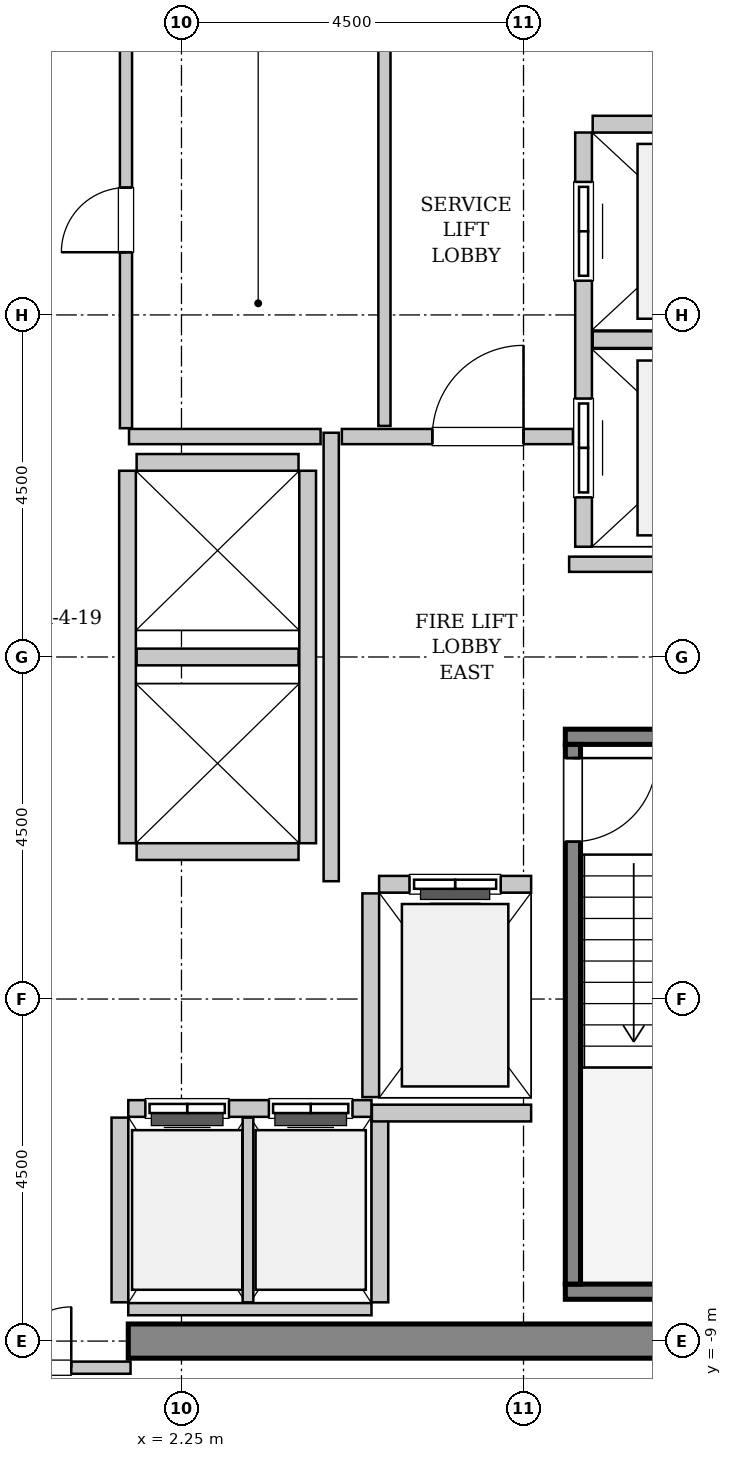
"""IFC4 building model, lengths in metres.
Left out: names, types, materials, properties, quantities, classifications, styles, units other than length and angle.
Written with IfcOpenShell. Run it as: python <this file> out.ifc"""

import sys

from ifc_helpers import new_model, si_unit, direction, frame, frame_2d, origin, place, context, subcontext, project, spatial, rectangle, extrude, source, transform, mapped, element, fill, save


model = new_model("IFC4")
c1 = context("Model", 3, precision=1e-05, world=origin(), true_north=direction((0.0, 1.0)))
c2 = subcontext(c1, "Body", "Model", "MODEL_VIEW")
j1 = project(units=[si_unit("LENGTHUNIT", "METRE"), si_unit("PLANEANGLEUNIT", "RADIAN")], contexts=[c1])
p1 = place(None, origin())
s1 = spatial("IfcSite", under=j1, at=p1, CompositionType="ELEMENT")
p2 = place(p1, origin())
s2 = spatial("IfcBuilding", under=s1, at=p2, CompositionType="ELEMENT")
p3 = place(p2, frame((0.0, 0.0, 210.4)))
s3 = spatial("IfcBuildingStorey", under=s2, at=p3, CompositionType="ELEMENT", Elevation=210.4)
m1 = source(origin(), c2, "Body", "SweptSolid", [
    extrude(rectangle(XDim=9.925, YDim=0.45, at=frame_2d((4.962, 0.0))), origin(), (0.0, 0.0, 1.0), 3.8),
])
p4 = place(p3, frame((1.55, -9.0, 0.0), z_axis=(0.0, 0.0, 1.0), x_axis=(1.0, 0.0, 0.0)))
e1 = element("IfcWall", 1, at=p4, inside=s3, PredefinedType="SHEAR", context=c2, shape_type="MappedRepresentation", body=[
    mapped(m1, transform((0.0, 0.0, 0.0), x_axis=(1.0, 0.0, 0.0), y_axis=(0.0, 1.0, 0.0), z_axis=(0.0, 0.0, 1.0), scale=1.0)),
])
m2 = source(origin(), c2, "Body", "SweptSolid", [
    extrude(rectangle(XDim=3.4, YDim=0.2, at=frame_2d((1.7, 0.0))), origin(), (0.0, 0.0, 1.0), 3.8),
])
p5 = place(p3, frame((7.3, -1.05, 0.0), z_axis=(0.0, 0.0, 1.0), x_axis=(1.0, 0.0, 0.0)))
e2 = element("IfcWall", 2, at=p5, inside=s3, PredefinedType="SOLIDWALL", context=c2, shape_type="MappedRepresentation", body=[
    mapped(m2, transform((0.0, 0.0, 0.0), x_axis=(1.0, 0.0, 0.0), y_axis=(0.0, 1.0, 0.0), z_axis=(0.0, 0.0, 1.0), scale=1.0)),
])
m3 = source(origin(), c2, "Body", "SweptSolid", [
    extrude(rectangle(XDim=3.73, YDim=0.2, at=frame_2d((1.865, 0.0))), origin(), (0.0, 0.0, 1.0), 3.8),
])
p6 = place(p3, frame((7.3, -8.35, 0.0), z_axis=(0.0, 0.0, 1.0), x_axis=(1.0, 0.0, 0.0)))
e3 = element("IfcWall", 3, at=p6, inside=s3, PredefinedType="SOLIDWALL", context=c2, shape_type="MappedRepresentation", body=[
    mapped(m3, transform((0.0, 0.0, 0.0), x_axis=(1.0, 0.0, 0.0), y_axis=(0.0, 1.0, 0.0), z_axis=(0.0, 0.0, 1.0), scale=1.0)),
])
m4 = source(origin(), c2, "Body", "SweptSolid", [
    extrude(rectangle(XDim=7.1, YDim=0.2, at=frame_2d((3.55, 0.0))), origin(), (0.0, 0.0, 1.0), 3.8),
])
p7 = place(p3, frame((7.4, -1.15, 0.0), z_axis=(0.0, 0.0, 1.0), x_axis=(0.0, -1.0, 0.0)))
e4 = element("IfcWall", 4, at=p7, inside=s3, PredefinedType="SOLIDWALL", context=c2, shape_type="MappedRepresentation", body=[
    mapped(m4, transform((0.0, 0.0, 0.0), x_axis=(1.0, 0.0, 0.0), y_axis=(0.0, 1.0, 0.0), z_axis=(0.0, 0.0, 1.0), scale=1.0)),
])
p8 = place(p7, frame((0.18, 0.0, 0.0)))
e5 = element("IfcOpeningElement", 5, at=p8, cuts=e4, PredefinedType="OPENING", context=c2, shape_type="SweptSolid", body=[
    extrude(rectangle(XDim=1.1, YDim=2.15, at=frame_2d((0.55, 1.075))), frame((0.0, 0.11, 0.0), z_axis=(0.0, -1.0, 0.0), x_axis=(1.0, 0.0, 0.0)), (0.0, 0.0, 1.0), 0.22),
])
m5 = source(origin(), c2, "Body", "SweptSolid", [
    extrude(rectangle(XDim=2.0, YDim=0.22, at=frame_2d((1.0, 0.0))), origin(), (0.0, 0.0, 1.0), 3.535),
])
p9 = place(p3, frame((6.85, -2.99, 0.0), z_axis=(0.0, 0.0, 1.0), x_axis=(-1.0, 0.0, 0.0)))
e6 = element("IfcWall", 6, at=p9, inside=s3, PredefinedType="SOLIDWALL", context=c2, shape_type="MappedRepresentation", body=[
    mapped(m5, transform((0.0, 0.0, 0.0), x_axis=(1.0, 0.0, 0.0), y_axis=(0.0, 1.0, 0.0), z_axis=(0.0, 0.0, 1.0), scale=1.0)),
])
p10 = place(p9, frame((0.4, 0.0, 0.0)))
e7 = element("IfcOpeningElement", 7, at=p10, cuts=e6, PredefinedType="OPENING", context=c2, shape_type="SweptSolid", body=[
    extrude(rectangle(XDim=1.2, YDim=2.2, at=frame_2d((0.6, 1.1))), frame((0.0, 0.12, 0.0), z_axis=(0.0, -1.0, 0.0), x_axis=(1.0, 0.0, 0.0)), (0.0, 0.0, 1.0), 0.24),
])
m6 = source(origin(), c2, "Body", "SweptSolid", [
    extrude(rectangle(XDim=2.68, YDim=0.22, at=frame_2d((1.34, 0.0))), origin(), (0.0, 0.0, 1.0), 3.535),
])
p11 = place(p3, frame((4.74, -3.11, 0.0), z_axis=(0.0, 0.0, 1.0), x_axis=(0.0, -1.0, 0.0)))
e8 = element("IfcWall", 8, at=p11, inside=s3, PredefinedType="SOLIDWALL", context=c2, shape_type="MappedRepresentation", body=[
    mapped(m6, transform((0.0, 0.0, 0.0), x_axis=(1.0, 0.0, 0.0), y_axis=(0.0, 1.0, 0.0), z_axis=(0.0, 0.0, 1.0), scale=1.0)),
])
m7 = source(origin(), c2, "Body", "SweptSolid", [
    extrude(rectangle(XDim=5.45, YDim=0.22, at=frame_2d((2.725, 0.0))), origin(), (0.0, 0.0, 1.0), 3.535),
])
p12 = place(p3, frame((7.54, 6.9, 0.0), z_axis=(0.0, 0.0, 1.0), x_axis=(0.0, -1.0, 0.0)))
e9 = element("IfcWall", 9, at=p12, inside=s3, PredefinedType="SOLIDWALL", context=c2, shape_type="MappedRepresentation", body=[
    mapped(m7, transform((0.0, 0.0, 0.0), x_axis=(1.0, 0.0, 0.0), y_axis=(0.0, 1.0, 0.0), z_axis=(0.0, 0.0, 1.0), scale=1.0)),
])
p13 = place(p12, frame((3.5, 0.0, 0.0)))
e10 = element("IfcOpeningElement", 10, at=p13, cuts=e9, PredefinedType="OPENING", context=c2, shape_type="SweptSolid", body=[
    extrude(rectangle(XDim=1.3, YDim=2.3, at=frame_2d((0.65, 1.15))), frame((0.0, 0.12, 0.0), z_axis=(0.0, -1.0, 0.0), x_axis=(1.0, 0.0, 0.0)), (0.0, 0.0, 1.0), 0.24),
])
p14 = place(p12, frame((0.65, 0.0, 0.0)))
e11 = element("IfcOpeningElement", 11, at=p14, cuts=e9, PredefinedType="OPENING", context=c2, shape_type="SweptSolid", body=[
    extrude(rectangle(XDim=1.3, YDim=2.3, at=frame_2d((0.65, 1.15))), frame((0.0, 0.12, 0.0), z_axis=(0.0, -1.0, 0.0), x_axis=(1.0, 0.0, 0.0)), (0.0, 0.0, 1.0), 0.24),
])
m8 = source(origin(), c2, "Body", "SweptSolid", [
    extrude(rectangle(XDim=2.78, YDim=0.22, at=frame_2d((1.39, 0.0))), origin(), (0.0, 0.0, 1.0), 3.535),
])
for number, where, z_axis, x_axis in (
    (12, (7.66, 4.175, 0.0), (0.0, 0.0, 1.0), (1.0, 0.0, 0.0)),
    (13, (10.44, 7.01, 0.0), (0.0, 0.0, 1.0), (-1.0, 0.0, 0.0)),
):
    element("IfcWall", number, at=place(p3, frame(where, z_axis=z_axis, x_axis=x_axis)), inside=s3, PredefinedType="SOLIDWALL", context=c2, shape_type="MappedRepresentation", body=[
        mapped(m8, transform((0.0, 0.0, 0.0), x_axis=(1.0, 0.0, 0.0), y_axis=(0.0, 1.0, 0.0), z_axis=(0.0, 0.0, 1.0), scale=1.0)),
    ])
m9 = source(origin(), c2, "Body", "SweptSolid", [
    extrude(rectangle(XDim=3.2, YDim=0.22, at=frame_2d((1.6, 0.0))), origin(), (0.0, 0.0, 1.0), 3.535),
])
p15 = place(p3, frame((4.75, -5.94, 0.0), z_axis=(0.0, 0.0, 1.0), x_axis=(-1.0, 0.0, 0.0)))
e14 = element("IfcWall", 14, at=p15, inside=s3, PredefinedType="SOLIDWALL", context=c2, shape_type="MappedRepresentation", body=[
    mapped(m9, transform((0.0, 0.0, 0.0), x_axis=(1.0, 0.0, 0.0), y_axis=(0.0, 1.0, 0.0), z_axis=(0.0, 0.0, 1.0), scale=1.0)),
])
p16 = place(p15, frame((1.875, 0.0, 0.0)))
e15 = element("IfcOpeningElement", 15, at=p16, cuts=e14, PredefinedType="OPENING", context=c2, shape_type="SweptSolid", body=[
    extrude(rectangle(XDim=1.1, YDim=2.2, at=frame_2d((0.55, 1.1))), frame((0.0, 0.12, 0.0), z_axis=(0.0, -1.0, 0.0), x_axis=(1.0, 0.0, 0.0)), (0.0, 0.0, 1.0), 0.24),
])
p17 = place(p15, frame((0.25, 0.0, 0.0)))
e16 = element("IfcOpeningElement", 16, at=p17, cuts=e14, PredefinedType="OPENING", context=c2, shape_type="SweptSolid", body=[
    extrude(rectangle(XDim=1.1, YDim=2.2, at=frame_2d((0.55, 1.1))), frame((0.0, 0.12, 0.0), z_axis=(0.0, -1.0, 0.0), x_axis=(1.0, 0.0, 0.0)), (0.0, 0.0, 1.0), 0.24),
])
m10 = source(origin(), c2, "Body", "SweptSolid", [
    extrude(rectangle(XDim=3.2, YDim=0.16, at=frame_2d((1.6, 0.0))), origin(), (0.0, 0.0, 1.0), 2.625),
])
p18 = place(p3, frame((1.55, -8.58, 0.0), z_axis=(0.0, 0.0, 1.0), x_axis=(1.0, 0.0, 0.0)))
e17 = element("IfcWall", 17, at=p18, inside=s3, PredefinedType="PARTITIONING", context=c2, shape_type="MappedRepresentation", body=[
    mapped(m10, transform((0.0, 0.0, 0.0), x_axis=(1.0, 0.0, 0.0), y_axis=(0.0, 1.0, 0.0), z_axis=(0.0, 0.0, 1.0), scale=1.0)),
])
m11 = source(origin(), c2, "Body", "SweptSolid", [
    extrude(rectangle(XDim=2.43, YDim=0.22, at=frame_2d((1.215, 0.0))), origin(), (0.0, 0.0, 1.0), 3.535),
])
p19 = place(p3, frame((1.44, -6.06, 0.0), z_axis=(0.0, 0.0, 1.0), x_axis=(0.0, -1.0, 0.0)))
e18 = element("IfcWall", 18, at=p19, inside=s3, PredefinedType="SOLIDWALL", context=c2, shape_type="MappedRepresentation", body=[
    mapped(m11, transform((0.0, 0.0, 0.0), x_axis=(1.0, 0.0, 0.0), y_axis=(0.0, 1.0, 0.0), z_axis=(0.0, 0.0, 1.0), scale=1.0)),
])
m12 = source(origin(), c2, "Body", "SweptSolid", [
    extrude(rectangle(XDim=2.43, YDim=0.14, at=frame_2d((1.215, 0.0))), origin(), (0.0, 0.0, 1.0), 3.535),
])
p20 = place(p3, frame((3.125, -8.49, 0.0), z_axis=(0.0, 0.0, 1.0), x_axis=(0.0, 1.0, 0.0)))
e19 = element("IfcWall", 19, at=p20, inside=s3, PredefinedType="PARTITIONING", context=c2, shape_type="MappedRepresentation", body=[
    mapped(m12, transform((0.0, 0.0, 0.0), x_axis=(1.0, 0.0, 0.0), y_axis=(0.0, 1.0, 0.0), z_axis=(0.0, 0.0, 1.0), scale=1.0)),
])
p21 = place(p3, frame((4.86, -8.49, 0.0), z_axis=(0.0, 0.0, 1.0), x_axis=(0.0, 1.0, 0.0)))
e20 = element("IfcWall", 20, at=p21, inside=s3, PredefinedType="SOLIDWALL", context=c2, shape_type="MappedRepresentation", body=[
    mapped(m11, transform((0.0, 0.0, 0.0), x_axis=(1.0, 0.0, 0.0), y_axis=(0.0, 1.0, 0.0), z_axis=(0.0, 0.0, 1.0), scale=1.0)),
])
m13 = source(origin(), c2, "Body", "SweptSolid", [
    extrude(rectangle(XDim=4.9, YDim=0.22, at=frame_2d((2.45, 0.0))), origin(), (0.0, 0.0, 1.0), 3.535),
])
for number, where, z_axis, x_axis in (
    (21, (1.54, 2.45, 0.0), (0.0, 0.0, 1.0), (0.0, -1.0, 0.0)),
    (22, (3.91, -2.45, 0.0), (0.0, 0.0, 1.0), (0.0, 1.0, 0.0)),
):
    element("IfcWall", number, at=place(p3, frame(where, z_axis=z_axis, x_axis=x_axis)), inside=s3, PredefinedType="SOLIDWALL", context=c2, shape_type="MappedRepresentation", body=[
        mapped(m13, transform((0.0, 0.0, 0.0), x_axis=(1.0, 0.0, 0.0), y_axis=(0.0, 1.0, 0.0), z_axis=(0.0, 0.0, 1.0), scale=1.0)),
    ])
m14 = source(origin(), c2, "Body", "SweptSolid", [
    extrude(rectangle(XDim=2.13, YDim=0.22, at=frame_2d((1.065, 0.0))), origin(), (0.0, 0.0, 1.0), 3.535),
])
for number, where, z_axis, x_axis in (
    (23, (1.66, -2.56, 0.0), (0.0, 0.0, 1.0), (1.0, 0.0, 0.0)),
    (24, (1.66, 0.0, 0.0), (0.0, 0.0, 1.0), (1.0, 0.0, 0.0)),
    (25, (3.79, 2.56, 0.0), (0.0, 0.0, 1.0), (-1.0, 0.0, 0.0)),
):
    element("IfcWall", number, at=place(p3, frame(where, z_axis=z_axis, x_axis=x_axis)), inside=s3, PredefinedType="SOLIDWALL", context=c2, shape_type="MappedRepresentation", body=[
        mapped(m14, transform((0.0, 0.0, 0.0), x_axis=(1.0, 0.0, 0.0), y_axis=(0.0, 1.0, 0.0), z_axis=(0.0, 0.0, 1.0), scale=1.0)),
    ])
m15 = source(origin(), c2, "Body", "SweptSolid", [
    extrude(rectangle(XDim=2.095, YDim=0.22, at=frame_2d((1.048, 0.0))), origin(), (0.0, 0.0, 1.0), 3.535),
])
p22 = place(p3, frame((4.755, -6.0, 0.0), z_axis=(0.0, 0.0, 1.0), x_axis=(1.0, 0.0, 0.0)))
e26 = element("IfcWall", 26, at=p22, inside=s3, PredefinedType="SOLIDWALL", context=c2, shape_type="MappedRepresentation", body=[
    mapped(m15, transform((0.0, 0.0, 0.0), x_axis=(1.0, 0.0, 0.0), y_axis=(0.0, 1.0, 0.0), z_axis=(0.0, 0.0, 1.0), scale=1.0)),
])
m16 = source(origin(), c2, "Body", "SweptSolid", [
    extrude(rectangle(XDim=5.9, YDim=0.2, at=frame_2d((2.95, 0.0))), origin(), (0.0, 0.0, 1.0), 3.535),
])
p23 = place(p3, frame((4.22, -2.95, 0.0), z_axis=(0.0, 0.0, 1.0), x_axis=(0.0, 1.0, 0.0)))
e27 = element("IfcWall", 27, at=p23, inside=s3, PredefinedType="PARTITIONING", context=c2, shape_type="MappedRepresentation", body=[
    mapped(m16, transform((0.0, 0.0, 0.0), x_axis=(1.0, 0.0, 0.0), y_axis=(0.0, 1.0, 0.0), z_axis=(0.0, 0.0, 1.0), scale=1.0)),
])
m17 = source(origin(), c2, "Body", "SweptSolid", [
    extrude(rectangle(XDim=2.52, YDim=0.2, at=frame_2d((1.26, 0.0))), origin(), (0.0, 0.0, 1.0), 3.535),
])
p24 = place(p3, frame((1.56, 2.9, 0.0), z_axis=(0.0, 0.0, 1.0), x_axis=(1.0, 0.0, 0.0)))
e28 = element("IfcWall", 28, at=p24, inside=s3, PredefinedType="PARTITIONING", context=c2, shape_type="MappedRepresentation", body=[
    mapped(m17, transform((0.0, 0.0, 0.0), x_axis=(1.0, 0.0, 0.0), y_axis=(0.0, 1.0, 0.0), z_axis=(0.0, 0.0, 1.0), scale=1.0)),
])
m18 = source(origin(), c2, "Body", "SweptSolid", [
    extrude(rectangle(XDim=3.04, YDim=0.2, at=frame_2d((1.52, 0.0))), origin(), (0.0, 0.0, 1.0), 3.535),
])
p25 = place(p3, frame((4.36, 2.9, 0.0), z_axis=(0.0, 0.0, 1.0), x_axis=(1.0, 0.0, 0.0)))
e29 = element("IfcWall", 29, at=p25, inside=s3, PredefinedType="PARTITIONING", context=c2, shape_type="MappedRepresentation", body=[
    mapped(m18, transform((0.0, 0.0, 0.0), x_axis=(1.0, 0.0, 0.0), y_axis=(0.0, 1.0, 0.0), z_axis=(0.0, 0.0, 1.0), scale=1.0)),
])
p26 = place(p25, frame((1.19, 0.0, 0.0)))
e30 = element("IfcOpeningElement", 30, at=p26, cuts=e29, PredefinedType="OPENING", context=c2, shape_type="SweptSolid", body=[
    extrude(rectangle(XDim=1.2, YDim=2.15, at=frame_2d((0.6, 1.075))), frame((0.0, 0.11, 0.0), z_axis=(0.0, -1.0, 0.0), x_axis=(1.0, 0.0, 0.0)), (0.0, 0.0, 1.0), 0.22),
])
m19 = source(origin(), c2, "Body", "SweptSolid", [
    extrude(rectangle(XDim=4.11, YDim=0.2, at=frame_2d((2.055, 0.0))), origin(), (0.0, 0.0, 1.0), 3.535),
])
p27 = place(p3, frame((7.35, 1.22, 0.0), z_axis=(0.0, 0.0, 1.0), x_axis=(1.0, 0.0, 0.0)))
e31 = element("IfcWall", 31, at=p27, inside=s3, PredefinedType="PARTITIONING", context=c2, shape_type="MappedRepresentation", body=[
    mapped(m19, transform((0.0, 0.0, 0.0), x_axis=(1.0, 0.0, 0.0), y_axis=(0.0, 1.0, 0.0), z_axis=(0.0, 0.0, 1.0), scale=1.0)),
])
m20 = source(origin(), c2, "Body", "SweptSolid", [
    extrude(rectangle(XDim=3.16, YDim=0.16, at=frame_2d((1.58, 0.0))), origin(), (0.0, 0.0, 1.0), 2.625),
])
p28 = place(p3, frame((-1.58, -9.35, 0.0), z_axis=(0.0, 0.0, 1.0), x_axis=(1.0, 0.0, 0.0)))
e32 = element("IfcWall", 32, at=p28, inside=s3, PredefinedType="PARTITIONING", context=c2, shape_type="MappedRepresentation", body=[
    mapped(m20, transform((0.0, 0.0, 0.0), x_axis=(1.0, 0.0, 0.0), y_axis=(0.0, 1.0, 0.0), z_axis=(0.0, 0.0, 1.0), scale=1.0)),
])
p29 = place(p28, frame((0.78, 0.0, 0.0)))
e33 = element("IfcOpeningElement", 33, at=p29, cuts=e32, PredefinedType="OPENING", context=c2, shape_type="SweptSolid", body=[
    extrude(rectangle(XDim=1.6, YDim=2.3, at=frame_2d((0.8, 1.15))), frame((0.0, 0.09, 0.0), z_axis=(0.0, -1.0, 0.0), x_axis=(1.0, 0.0, 0.0)), (0.0, 0.0, 1.0), 0.18),
])
m21 = source(origin(), c2, "Body", "SweptSolid", [
    extrude(rectangle(XDim=5.45, YDim=0.16, at=frame_2d((2.725, 0.0))), origin(), (0.0, 0.0, 1.0), 3.535),
])
p30 = place(p3, frame((4.92, 3.04, 0.0), z_axis=(0.0, 0.0, 1.0), x_axis=(0.0, 1.0, 0.0)))
e34 = element("IfcWall", 34, at=p30, inside=s3, PredefinedType="PARTITIONING", context=c2, shape_type="MappedRepresentation", body=[
    mapped(m21, transform((0.0, 0.0, 0.0), x_axis=(1.0, 0.0, 0.0), y_axis=(0.0, 1.0, 0.0), z_axis=(0.0, 0.0, 1.0), scale=1.0)),
])
m22 = source(origin(), c2, "Body", "SweptSolid", [
    extrude(rectangle(XDim=5.48, YDim=0.16, at=frame_2d((2.74, 0.0))), origin(), (0.0, 0.0, 1.0), 3.535),
])
p31 = place(p3, frame((1.52, 3.01, 0.0), z_axis=(0.0, 0.0, 1.0), x_axis=(0.0, 1.0, 0.0)))
e35 = element("IfcWall", 35, at=p31, inside=s3, PredefinedType="PARTITIONING", context=c2, shape_type="MappedRepresentation", body=[
    mapped(m22, transform((0.0, 0.0, 0.0), x_axis=(1.0, 0.0, 0.0), y_axis=(0.0, 1.0, 0.0), z_axis=(0.0, 0.0, 1.0), scale=1.0)),
])
p32 = place(p31, frame((2.315, 0.0, 0.0)))
e36 = element("IfcOpeningElement", 36, at=p32, cuts=e35, PredefinedType="OPENING", context=c2, shape_type="SweptSolid", body=[
    extrude(rectangle(XDim=0.85, YDim=2.1, at=frame_2d((0.425, 1.05))), frame((0.0, 0.09, 0.0), z_axis=(0.0, -1.0, 0.0), x_axis=(1.0, 0.0, 0.0)), (0.0, 0.0, 1.0), 0.18),
])
m23 = source(origin(), c2, "Body", "SweptSolid", [
    extrude(rectangle(XDim=1.1, YDim=2.15, at=frame_2d((0.55, 1.075))), frame((0.0, 0.025, 0.0), z_axis=(0.0, -1.0, 0.0), x_axis=(1.0, 0.0, 0.0)), (0.0, 0.0, 1.0), 0.05),
])
p33 = place(p8, origin())
e37 = element("IfcDoor", 37, at=p33, inside=s3, OperationType="SINGLE_SWING_LEFT", PredefinedType="DOOR", context=c2, shape_type="MappedRepresentation", body=[
    mapped(m23, transform((0.0, 0.0, 0.0), x_axis=(1.0, 0.0, 0.0), y_axis=(0.0, 1.0, 0.0), z_axis=(0.0, 0.0, 1.0), scale=1.0)),
])
fill(e5, e37)
m24 = source(origin(), c2, "Body", "SweptSolid", [
    extrude(rectangle(XDim=1.2, YDim=2.2, at=frame_2d((0.6, 1.1))), frame((0.0, 0.025, 0.0), z_axis=(0.0, -1.0, 0.0), x_axis=(1.0, 0.0, 0.0)), (0.0, 0.0, 1.0), 0.05),
])
p34 = place(p10, origin())
e38 = element("IfcDoor", 38, at=p34, inside=s3, OperationType="SLIDING_TO_LEFT", PredefinedType="DOOR", context=c2, shape_type="MappedRepresentation", body=[
    mapped(m24, transform((0.0, 0.0, 0.0), x_axis=(1.0, 0.0, 0.0), y_axis=(0.0, 1.0, 0.0), z_axis=(0.0, 0.0, 1.0), scale=1.0)),
])
fill(e7, e38)
m25 = source(origin(), c2, "Body", "SweptSolid", [
    extrude(rectangle(XDim=1.3, YDim=2.3, at=frame_2d((0.65, 1.15))), frame((0.0, 0.025, 0.0), z_axis=(0.0, -1.0, 0.0), x_axis=(1.0, 0.0, 0.0)), (0.0, 0.0, 1.0), 0.05),
])
p35 = place(p13, origin())
e39 = element("IfcDoor", 39, at=p35, inside=s3, OperationType="SLIDING_TO_RIGHT", PredefinedType="DOOR", context=c2, shape_type="MappedRepresentation", body=[
    mapped(m25, transform((0.0, 0.0, 0.0), x_axis=(1.0, 0.0, 0.0), y_axis=(0.0, 1.0, 0.0), z_axis=(0.0, 0.0, 1.0), scale=1.0)),
])
fill(e10, e39)
p36 = place(p14, origin())
e40 = element("IfcDoor", 40, at=p36, inside=s3, OperationType="SLIDING_TO_RIGHT", PredefinedType="DOOR", context=c2, shape_type="MappedRepresentation", body=[
    mapped(m25, transform((0.0, 0.0, 0.0), x_axis=(1.0, 0.0, 0.0), y_axis=(0.0, 1.0, 0.0), z_axis=(0.0, 0.0, 1.0), scale=1.0)),
])
fill(e11, e40)
m26 = source(origin(), c2, "Body", "SweptSolid", [
    extrude(rectangle(XDim=1.1, YDim=2.2, at=frame_2d((0.55, 1.1))), frame((0.0, 0.025, 0.0), z_axis=(0.0, -1.0, 0.0), x_axis=(1.0, 0.0, 0.0)), (0.0, 0.0, 1.0), 0.05),
])
p37 = place(p16, origin())
e41 = element("IfcDoor", 41, at=p37, inside=s3, OperationType="DOUBLE_DOOR_SLIDING", PredefinedType="DOOR", context=c2, shape_type="MappedRepresentation", body=[
    mapped(m26, transform((0.0, 0.0, 0.0), x_axis=(1.0, 0.0, 0.0), y_axis=(0.0, 1.0, 0.0), z_axis=(0.0, 0.0, 1.0), scale=1.0)),
])
fill(e15, e41)
p38 = place(p17, origin())
e42 = element("IfcDoor", 42, at=p38, inside=s3, OperationType="DOUBLE_DOOR_SLIDING", PredefinedType="DOOR", context=c2, shape_type="MappedRepresentation", body=[
    mapped(m26, transform((0.0, 0.0, 0.0), x_axis=(1.0, 0.0, 0.0), y_axis=(0.0, 1.0, 0.0), z_axis=(0.0, 0.0, 1.0), scale=1.0)),
])
fill(e16, e42)
m27 = source(origin(), c2, "Body", "SweptSolid", [
    extrude(rectangle(XDim=1.2, YDim=2.15, at=frame_2d((0.6, 1.075))), frame((0.0, 0.025, 0.0), z_axis=(0.0, -1.0, 0.0), x_axis=(1.0, 0.0, 0.0)), (0.0, 0.0, 1.0), 0.05),
])
p39 = place(p26, origin())
e43 = element("IfcDoor", 43, at=p39, inside=s3, OperationType="SINGLE_SWING_RIGHT", PredefinedType="DOOR", context=c2, shape_type="MappedRepresentation", body=[
    mapped(m27, transform((0.0, 0.0, 0.0), x_axis=(1.0, 0.0, 0.0), y_axis=(0.0, 1.0, 0.0), z_axis=(0.0, 0.0, 1.0), scale=1.0)),
])
fill(e30, e43)
m28 = source(origin(), c2, "Body", "SweptSolid", [
    extrude(rectangle(XDim=1.6, YDim=2.3, at=frame_2d((0.8, 1.15))), frame((0.0, 0.025, 0.0), z_axis=(0.0, -1.0, 0.0), x_axis=(1.0, 0.0, 0.0)), (0.0, 0.0, 1.0), 0.05),
])
p40 = place(p29, origin())
e44 = element("IfcDoor", 44, at=p40, inside=s3, OperationType="DOUBLE_DOOR_SINGLE_SWING", PredefinedType="DOOR", context=c2, shape_type="MappedRepresentation", body=[
    mapped(m28, transform((0.0, 0.0, 0.0), x_axis=(1.0, 0.0, 0.0), y_axis=(0.0, 1.0, 0.0), z_axis=(0.0, 0.0, 1.0), scale=1.0)),
])
fill(e33, e44)
m29 = source(origin(), c2, "Body", "SweptSolid", [
    extrude(rectangle(XDim=0.85, YDim=2.1, at=frame_2d((0.425, 1.05))), frame((0.0, 0.025, 0.0), z_axis=(0.0, -1.0, 0.0), x_axis=(1.0, 0.0, 0.0)), (0.0, 0.0, 1.0), 0.05),
])
p41 = place(p32, origin())
e45 = element("IfcDoor", 45, at=p41, inside=s3, OperationType="SINGLE_SWING_LEFT", PredefinedType="DOOR", context=c2, shape_type="MappedRepresentation", body=[
    mapped(m29, transform((0.0, 0.0, 0.0), x_axis=(1.0, 0.0, 0.0), y_axis=(0.0, 1.0, 0.0), z_axis=(0.0, 0.0, 1.0), scale=1.0)),
])
fill(e36, e45)
save(model, sys.argv[1])
